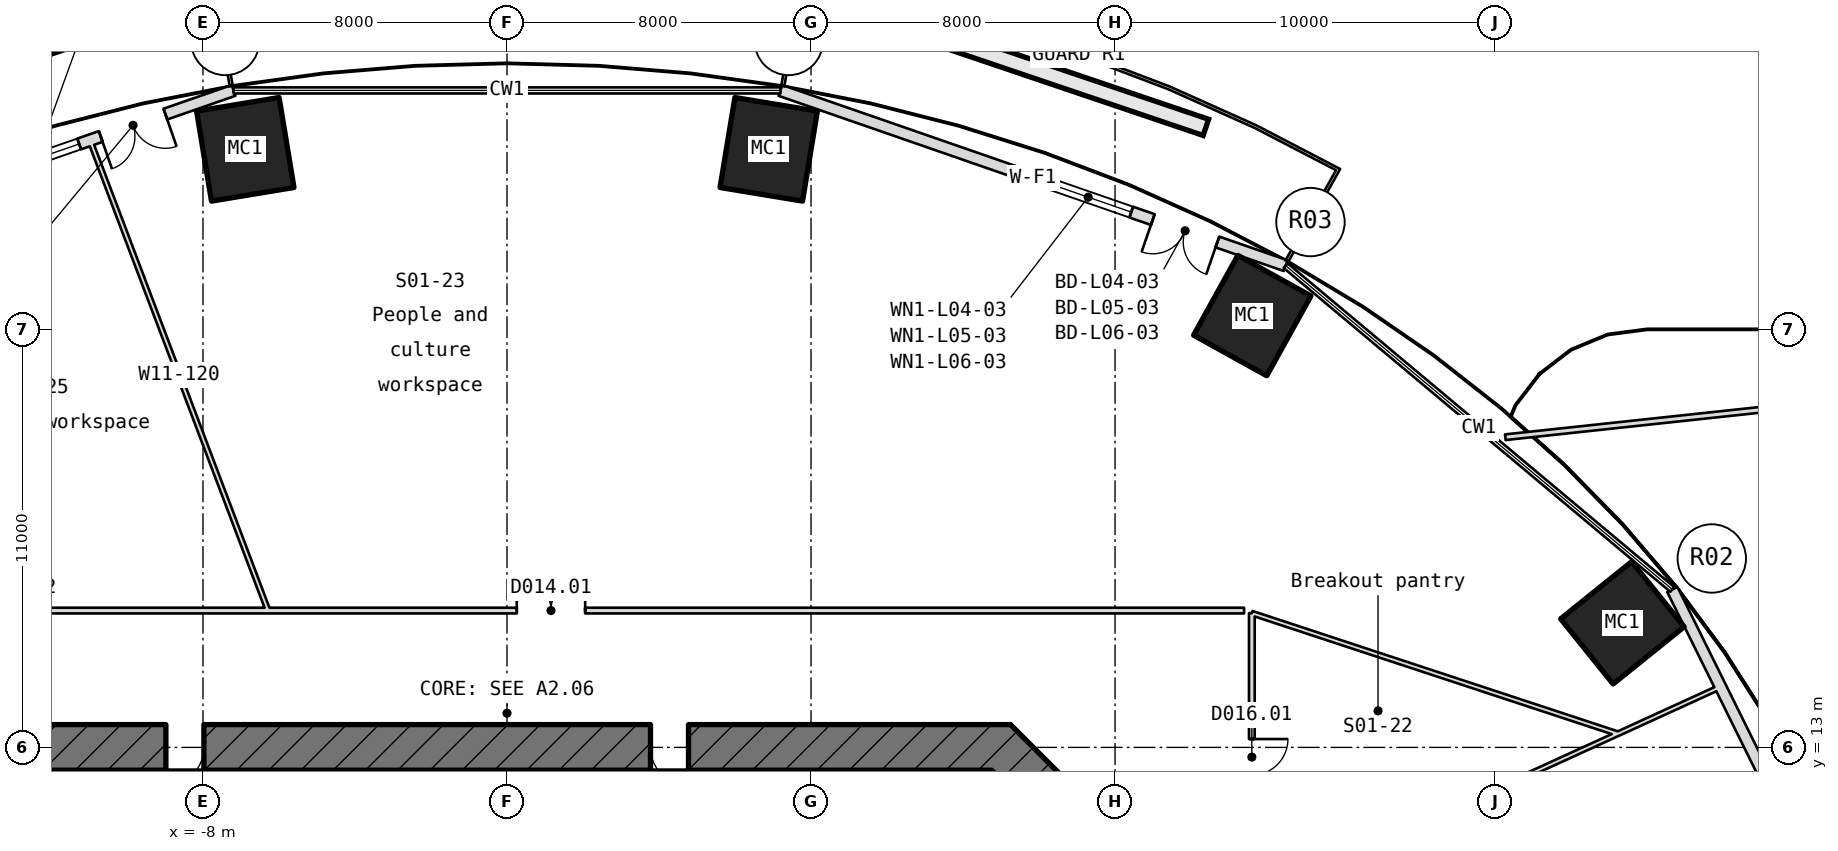
"""IFC4 building model, lengths in metres.
Left out: names, types, materials, properties, quantities, classifications, styles, units other than length and angle.
Written with IfcOpenShell. Run it as: python <this file> out.ifc"""

import sys

from ifc_helpers import new_model, si_unit, direction, frame, frame_2d, origin, origin_2d, place, context, subcontext, project, spatial, rectangle, hollow_rectangle, extrude, element, fill, save


model = new_model("IFC4")
c1 = context("Model", 3, precision=1e-05, world=origin(), true_north=direction((0.0, 1.0)))
c2 = subcontext(c1, "Body", "Model", "MODEL_VIEW")
j1 = project(units=[si_unit("LENGTHUNIT", "METRE"), si_unit("PLANEANGLEUNIT", "RADIAN")], contexts=[c1])
p1 = place(None, origin())
s1 = spatial("IfcSite", under=j1, at=p1, CompositionType="ELEMENT")
p2 = place(p1, origin())
s2 = spatial("IfcBuilding", under=s1, at=p2, CompositionType="ELEMENT")
p3 = place(p2, frame((0.0, 0.0, 33.0)))
s3 = spatial("IfcBuildingStorey", under=s2, at=p3, CompositionType="ELEMENT", Elevation=33.0)
for number, where, z_axis, x_axis in (
    (1, (29.351, 16.278, -0.18), (0.0, 0.0, 1.0), (0.627, -0.779, 0.0)),
    (2, (19.612, 24.362, -0.18), (0.0, 0.0, 1.0), (0.875, -0.485, 0.0)),
    (3, (6.887, 28.737, -0.18), (0.0, 0.0, 1.0), (0.987, -0.163, 0.0)),
    (4, (-6.887, 28.737, -0.18), (0.0, 0.0, 1.0), (0.987, 0.163, 0.0)),
):
    element("IfcColumn", number, at=place(p3, frame(where, z_axis=z_axis, x_axis=x_axis)), inside=s3, PredefinedType="COLUMN", context=c2, shape_type="SweptSolid", body=[
        extrude(hollow_rectangle(XDim=2.2, YDim=2.4, WallThickness=0.09, at=origin_2d()), origin(), (0.0, 0.0, 1.0), 4.15),
    ])
p4 = place(p3, frame((26.27, 21.162, -0.04), z_axis=(0.0, 0.0, 1.0), x_axis=(0.994280882385, 0.106796661575, 0.0)))
e5 = element("IfcWall", 5, at=p4, inside=s3, PredefinedType="PARAPET", context=c2, shape_type="SweptSolid", body=[
    extrude(rectangle(XDim=25.873, YDim=0.15, at=frame_2d((12.937, 0.0))), origin(), (0.0, 0.0, 1.0), 1.1),
])
p5 = place(p3, frame((36.171, 6.024, 0.0), z_axis=(0.0, 0.0, 1.0), x_axis=(-0.443411588907, 0.896318114747, 0.0)))
e6 = element("IfcWall", 6, at=p5, inside=s3, PredefinedType="SOLIDWALL", context=c2, shape_type="SweptSolid", body=[
    extrude(rectangle(XDim=12.419, YDim=0.3, at=frame_2d((6.209, 0.0))), origin(), (0.0, 0.0, 1.0), 3.97),
])
p6 = place(p5, frame((1.9, 0.0, 0.0)))
e7 = element("IfcOpeningElement", 7, at=p6, cuts=e6, PredefinedType="OPENING", context=c2, shape_type="SweptSolid", body=[
    extrude(rectangle(XDim=1.8, YDim=2.4, at=frame_2d((0.9, 1.2))), frame((0.0, 0.16, 0.0), z_axis=(0.0, -1.0, 0.0), x_axis=(1.0, 0.0, 0.0)), (0.0, 0.0, 1.0), 0.32),
])
p7 = place(p5, frame((4.3, 0.0, 0.9)))
e8 = element("IfcOpeningElement", 8, at=p7, cuts=e6, PredefinedType="OPENING", context=c2, shape_type="SweptSolid", body=[
    extrude(rectangle(XDim=2.4, YDim=1.5, at=frame_2d((1.2, 0.75))), frame((0.0, 0.16, 0.0), z_axis=(0.0, -1.0, 0.0), x_axis=(1.0, 0.0, 0.0)), (0.0, 0.0, 1.0), 0.32),
])
p8 = place(p3, frame((20.49, 25.676, 0.0), z_axis=(0.0, 0.0, 1.0), x_axis=(-0.944791803015, 0.327671251341, 0.0)))
e9 = element("IfcWall", 9, at=p8, inside=s3, PredefinedType="SOLIDWALL", context=c2, shape_type="SweptSolid", body=[
    extrude(rectangle(XDim=14.072, YDim=0.3, at=frame_2d((7.036, 0.0))), origin(), (0.0, 0.0, 1.0), 3.97),
])
p9 = place(p8, frame((1.9, 0.0, 0.0)))
e10 = element("IfcOpeningElement", 10, at=p9, cuts=e9, PredefinedType="OPENING", context=c2, shape_type="SweptSolid", body=[
    extrude(rectangle(XDim=1.8, YDim=2.4, at=frame_2d((0.9, 1.2))), frame((0.0, 0.16, 0.0), z_axis=(0.0, -1.0, 0.0), x_axis=(1.0, 0.0, 0.0)), (0.0, 0.0, 1.0), 0.32),
])
p10 = place(p8, frame((4.3, 0.0, 0.9)))
e11 = element("IfcOpeningElement", 11, at=p10, cuts=e9, PredefinedType="OPENING", context=c2, shape_type="SweptSolid", body=[
    extrude(rectangle(XDim=2.4, YDim=1.5, at=frame_2d((1.2, 0.75))), frame((0.0, 0.16, 0.0), z_axis=(0.0, -1.0, 0.0), x_axis=(1.0, 0.0, 0.0)), (0.0, 0.0, 1.0), 0.32),
])
p11 = place(p3, frame((-7.195, 30.287, 0.0), z_axis=(0.0, 0.0, 1.0), x_axis=(-0.944791803015, -0.327671251341, 0.0)))
e12 = element("IfcWall", 12, at=p11, inside=s3, PredefinedType="SOLIDWALL", context=c2, shape_type="SweptSolid", body=[
    extrude(rectangle(XDim=14.072, YDim=0.3, at=frame_2d((7.036, 0.0))), origin(), (0.0, 0.0, 1.0), 3.97),
])
p12 = place(p11, frame((1.9, 0.0, 0.0)))
e13 = element("IfcOpeningElement", 13, at=p12, cuts=e12, PredefinedType="OPENING", context=c2, shape_type="SweptSolid", body=[
    extrude(rectangle(XDim=1.8, YDim=2.4, at=frame_2d((0.9, 1.2))), frame((0.0, 0.16, 0.0), z_axis=(0.0, -1.0, 0.0), x_axis=(1.0, 0.0, 0.0)), (0.0, 0.0, 1.0), 0.32),
])
p13 = place(p11, frame((4.3, 0.0, 0.9)))
e14 = element("IfcOpeningElement", 14, at=p13, cuts=e12, PredefinedType="OPENING", context=c2, shape_type="SweptSolid", body=[
    extrude(rectangle(XDim=2.4, YDim=1.5, at=frame_2d((1.2, 0.75))), frame((0.0, 0.16, 0.0), z_axis=(0.0, -1.0, 0.0), x_axis=(1.0, 0.0, 0.0)), (0.0, 0.0, 1.0), 0.32),
])
p14 = place(p3, frame((16.176, 9.824, -0.18), z_axis=(0.0, 0.0, 1.0), x_axis=(-0.707106781187, 0.707106781187, 0.0)))
e15 = element("IfcWall", 15, at=p14, inside=s3, PredefinedType="SHEAR", context=c2, shape_type="SweptSolid", body=[
    extrude(rectangle(XDim=4.74, YDim=1.2, at=frame_2d((2.37, 0.0))), origin(), (0.0, 0.0, 1.0), 4.15),
])
p15 = place(p3, frame((13.249, 13.0, -0.18), z_axis=(0.0, 0.0, 1.0), x_axis=(-1.0, 0.0, 0.0)))
e16 = element("IfcWall", 16, at=p15, inside=s3, PredefinedType="SHEAR", context=c2, shape_type="SweptSolid", body=[
    extrude(rectangle(XDim=26.497, YDim=1.2, at=frame_2d((13.249, 0.0))), origin(), (0.0, 0.0, 1.0), 4.15),
])
p16 = place(p15, frame((21.225, 0.0, 0.18)))
e17 = element("IfcOpeningElement", 17, at=p16, cuts=e16, PredefinedType="OPENING", context=c2, shape_type="SweptSolid", body=[
    extrude(rectangle(XDim=1.0, YDim=2.1, at=frame_2d((0.5, 1.05))), frame((0.0, 0.61, 0.0), z_axis=(0.0, -1.0, 0.0), x_axis=(1.0, 0.0, 0.0)), (0.0, 0.0, 1.0), 1.22),
])
p17 = place(p15, frame((8.472, 0.0, 0.18)))
e18 = element("IfcOpeningElement", 18, at=p17, cuts=e16, PredefinedType="OPENING", context=c2, shape_type="SweptSolid", body=[
    extrude(rectangle(XDim=1.0, YDim=2.1, at=frame_2d((0.5, 1.05))), frame((0.0, 0.61, 0.0), z_axis=(0.0, -1.0, 0.0), x_axis=(1.0, 0.0, 0.0)), (0.0, 0.0, 1.0), 1.22),
])
p18 = place(p3, frame((-4.2, 8.46, 0.0), z_axis=(0.0, 0.0, 1.0), x_axis=(0.0, 1.0, 0.0)))
e19 = element("IfcWall", 19, at=p18, inside=s3, PredefinedType="PARTITIONING", context=c2, shape_type="SweptSolid", body=[
    extrude(rectangle(XDim=3.94, YDim=0.15, at=frame_2d((1.97, 0.0))), origin(), (0.0, 0.0, 1.0), 3.97),
])
p19 = place(p3, frame((-19.6, 16.6, 0.0), z_axis=(0.0, 0.0, 1.0), x_axis=(1.0, 0.0, 0.0)))
e20 = element("IfcWall", 20, at=p19, inside=s3, PredefinedType="PARTITIONING", context=c2, shape_type="SweptSolid", body=[
    extrude(rectangle(XDim=38.996, YDim=0.15, at=frame_2d((19.498, 0.0))), origin(), (0.0, 0.0, 1.0), 3.97),
])
p20 = place(p19, frame((19.857, 0.0, 0.0)))
e21 = element("IfcOpeningElement", 21, at=p20, cuts=e20, PredefinedType="OPENING", context=c2, shape_type="SweptSolid", body=[
    extrude(rectangle(XDim=1.8, YDim=2.1, at=frame_2d((0.9, 1.05))), frame((0.0, 0.085, 0.0), z_axis=(0.0, -1.0, 0.0), x_axis=(1.0, 0.0, 0.0)), (0.0, 0.0, 1.0), 0.17),
])
p21 = place(p19, frame((5.757, 0.0, 0.0)))
e22 = element("IfcOpeningElement", 22, at=p21, cuts=e20, PredefinedType="OPENING", context=c2, shape_type="SweptSolid", body=[
    extrude(rectangle(XDim=1.8, YDim=2.1, at=frame_2d((0.9, 1.05))), frame((0.0, 0.085, 0.0), z_axis=(0.0, -1.0, 0.0), x_axis=(1.0, 0.0, 0.0)), (0.0, 0.0, 1.0), 0.17),
])
p22 = place(p3, frame((-6.287, 16.6, 0.0), z_axis=(0.0, 0.0, 1.0), x_axis=(-0.35419259506, 0.935172500453, 0.0)))
e23 = element("IfcWall", 23, at=p22, inside=s3, PredefinedType="PARTITIONING", context=c2, shape_type="SweptSolid", body=[
    extrude(rectangle(XDim=13.234, YDim=0.12, at=frame_2d((6.617, 0.0))), origin(), (0.0, 0.0, 1.0), 3.97),
])
p23 = place(p3, frame((19.6, 8.957, 0.0), z_axis=(0.0, 0.0, 1.0), x_axis=(0.909522905178, 0.415653804213, 0.0)))
e24 = element("IfcWall", 24, at=p23, inside=s3, PredefinedType="PARTITIONING", context=c2, shape_type="SweptSolid", body=[
    extrude(rectangle(XDim=13.559, YDim=0.12, at=frame_2d((6.78, 0.0))), origin(), (0.0, 0.0, 1.0), 3.97),
])
p24 = place(p3, frame((19.6, 16.533, 0.0), z_axis=(0.0, 0.0, 1.0), x_axis=(0.0, -1.0, 0.0)))
e25 = element("IfcWall", 25, at=p24, inside=s3, PredefinedType="PARTITIONING", context=c2, shape_type="SweptSolid", body=[
    extrude(rectangle(XDim=33.133, YDim=0.15, at=frame_2d((16.566, 0.0))), origin(), (0.0, 0.0, 1.0), 3.97),
])
p25 = place(p24, frame((3.313, 0.0, 0.0)))
e26 = element("IfcOpeningElement", 26, at=p25, cuts=e25, PredefinedType="OPENING", context=c2, shape_type="SweptSolid", body=[
    extrude(rectangle(XDim=0.95, YDim=2.1, at=frame_2d((0.475, 1.05))), frame((0.0, 0.085, 0.0), z_axis=(0.0, -1.0, 0.0), x_axis=(1.0, 0.0, 0.0)), (0.0, 0.0, 1.0), 0.17),
])
p26 = place(p24, frame((16.441, 0.0, 0.0)))
e27 = element("IfcOpeningElement", 27, at=p26, cuts=e25, PredefinedType="OPENING", context=c2, shape_type="SweptSolid", body=[
    extrude(rectangle(XDim=0.95, YDim=2.1, at=frame_2d((0.475, 1.05))), frame((0.0, 0.085, 0.0), z_axis=(0.0, -1.0, 0.0), x_axis=(1.0, 0.0, 0.0)), (0.0, 0.0, 1.0), 0.17),
])
p27 = place(p24, frame((13.829, 0.0, 0.0)))
e28 = element("IfcOpeningElement", 28, at=p27, cuts=e25, PredefinedType="OPENING", context=c2, shape_type="SweptSolid", body=[
    extrude(rectangle(XDim=0.95, YDim=2.1, at=frame_2d((0.475, 1.05))), frame((0.0, 0.085, 0.0), z_axis=(0.0, -1.0, 0.0), x_axis=(1.0, 0.0, 0.0)), (0.0, 0.0, 1.0), 0.17),
])
p28 = place(p24, frame((11.171, 0.0, 0.0)))
e29 = element("IfcOpeningElement", 29, at=p28, cuts=e25, PredefinedType="OPENING", context=c2, shape_type="SweptSolid", body=[
    extrude(rectangle(XDim=0.95, YDim=2.1, at=frame_2d((0.475, 1.05))), frame((0.0, 0.085, 0.0), z_axis=(0.0, -1.0, 0.0), x_axis=(1.0, 0.0, 0.0)), (0.0, 0.0, 1.0), 0.17),
])
p29 = place(p24, frame((8.466, 0.0, 0.0)))
e30 = element("IfcOpeningElement", 30, at=p29, cuts=e25, PredefinedType="OPENING", context=c2, shape_type="SweptSolid", body=[
    extrude(rectangle(XDim=0.95, YDim=2.1, at=frame_2d((0.475, 1.05))), frame((0.0, 0.085, 0.0), z_axis=(0.0, -1.0, 0.0), x_axis=(1.0, 0.0, 0.0)), (0.0, 0.0, 1.0), 0.17),
])
p30 = place(p24, frame((19.308, 0.0, 0.0)))
e31 = element("IfcOpeningElement", 31, at=p30, cuts=e25, PredefinedType="OPENING", context=c2, shape_type="SweptSolid", body=[
    extrude(rectangle(XDim=0.95, YDim=2.1, at=frame_2d((0.475, 1.05))), frame((0.0, 0.085, 0.0), z_axis=(0.0, -1.0, 0.0), x_axis=(1.0, 0.0, 0.0)), (0.0, 0.0, 1.0), 0.17),
])
p31 = place(p3, frame((29.233, 13.359, 0.0), z_axis=(0.0, 0.0, 1.0), x_axis=(-0.949784766096, 0.312903975834, 0.0)))
e32 = element("IfcWall", 32, at=p31, inside=s3, PredefinedType="PARTITIONING", context=c2, shape_type="SweptSolid", body=[
    extrude(rectangle(XDim=10.142, YDim=0.12, at=frame_2d((5.071, 0.0))), origin(), (0.0, 0.0, 1.0), 3.97),
])
p32 = place(p9, origin())
e33 = element("IfcDoor", 33, at=p32, inside=s3, OperationType="SINGLE_SWING_LEFT", PredefinedType="DOOR", context=c2, shape_type="SweptSolid", body=[
    extrude(rectangle(XDim=1.8, YDim=2.4, at=frame_2d((0.9, 1.2))), frame((0.0, 0.025, 0.0), z_axis=(0.0, -1.0, 0.0), x_axis=(1.0, 0.0, 0.0)), (0.0, 0.0, 1.0), 0.05),
])
fill(e10, e33)
p33 = place(p10, origin())
e34 = element("IfcWindow", 34, at=p33, inside=s3, PartitioningType="SINGLE_PANEL", PredefinedType="WINDOW", context=c2, shape_type="SweptSolid", body=[
    extrude(rectangle(XDim=2.4, YDim=1.5, at=frame_2d((1.2, 0.75))), frame((0.0, 0.03, 0.0), z_axis=(0.0, -1.0, 0.0), x_axis=(1.0, 0.0, 0.0)), (0.0, 0.0, 1.0), 0.06),
])
fill(e11, e34)
p34 = place(p12, origin())
e35 = element("IfcDoor", 35, at=p34, inside=s3, OperationType="SINGLE_SWING_LEFT", PredefinedType="DOOR", context=c2, shape_type="SweptSolid", body=[
    extrude(rectangle(XDim=1.8, YDim=2.4, at=frame_2d((0.9, 1.2))), frame((0.0, 0.025, 0.0), z_axis=(0.0, -1.0, 0.0), x_axis=(1.0, 0.0, 0.0)), (0.0, 0.0, 1.0), 0.05),
])
fill(e13, e35)
p35 = place(p13, origin())
e36 = element("IfcWindow", 36, at=p35, inside=s3, PartitioningType="SINGLE_PANEL", PredefinedType="WINDOW", context=c2, shape_type="SweptSolid", body=[
    extrude(rectangle(XDim=2.4, YDim=1.5, at=frame_2d((1.2, 0.75))), frame((0.0, 0.03, 0.0), z_axis=(0.0, -1.0, 0.0), x_axis=(1.0, 0.0, 0.0)), (0.0, 0.0, 1.0), 0.06),
])
fill(e14, e36)
p36 = place(p16, origin())
e37 = element("IfcDoor", 37, at=p36, inside=s3, OperationType="SINGLE_SWING_RIGHT", PredefinedType="DOOR", context=c2, shape_type="SweptSolid", body=[
    extrude(rectangle(XDim=1.0, YDim=2.1, at=frame_2d((0.5, 1.05))), frame((0.0, 0.025, 0.0), z_axis=(0.0, -1.0, 0.0), x_axis=(1.0, 0.0, 0.0)), (0.0, 0.0, 1.0), 0.05),
])
fill(e17, e37)
p37 = place(p17, origin())
e38 = element("IfcDoor", 38, at=p37, inside=s3, OperationType="SINGLE_SWING_RIGHT", PredefinedType="DOOR", context=c2, shape_type="SweptSolid", body=[
    extrude(rectangle(XDim=1.0, YDim=2.1, at=frame_2d((0.5, 1.05))), frame((0.0, 0.025, 0.0), z_axis=(0.0, -1.0, 0.0), x_axis=(1.0, 0.0, 0.0)), (0.0, 0.0, 1.0), 0.05),
])
fill(e18, e38)
p38 = place(p25, origin())
e39 = element("IfcDoor", 39, at=p38, inside=s3, OperationType="SINGLE_SWING_RIGHT", PredefinedType="DOOR", context=c2, shape_type="SweptSolid", body=[
    extrude(rectangle(XDim=0.95, YDim=2.1, at=frame_2d((0.475, 1.05))), frame((0.0, 0.025, 0.0), z_axis=(0.0, -1.0, 0.0), x_axis=(1.0, 0.0, 0.0)), (0.0, 0.0, 1.0), 0.05),
])
fill(e26, e39)
p39 = place(p20, origin())
e40 = element("IfcDoor", 40, at=p39, inside=s3, OperationType="DOUBLE_DOOR_SINGLE_SWING", PredefinedType="DOOR", context=c2, shape_type="SweptSolid", body=[
    extrude(rectangle(XDim=1.8, YDim=2.1, at=frame_2d((0.9, 1.05))), frame((0.0, 0.025, 0.0), z_axis=(0.0, -1.0, 0.0), x_axis=(1.0, 0.0, 0.0)), (0.0, 0.0, 1.0), 0.05),
])
fill(e21, e40)
save(model, sys.argv[1])
